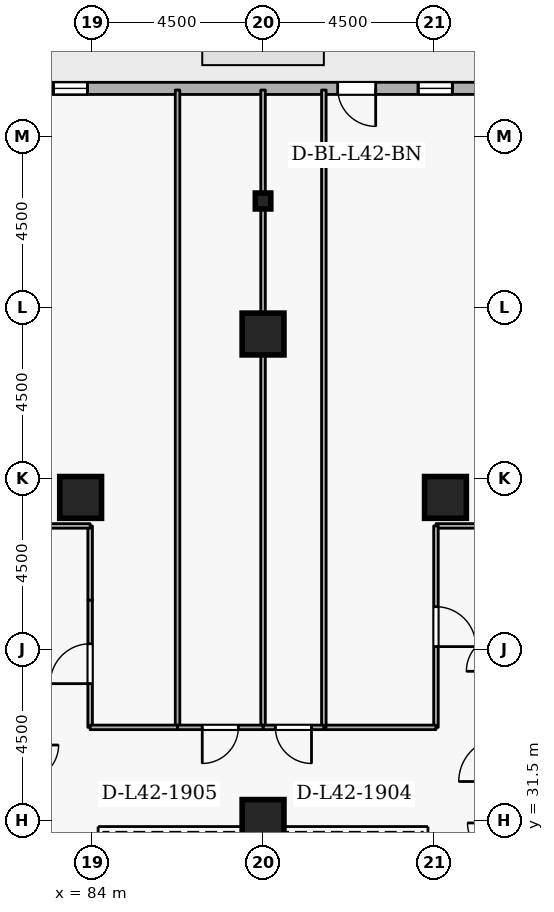
"""IFC4 building model, lengths in metres.
Left out: names, types, materials, properties, quantities, classifications, styles, units other than length and angle.
Written with IfcOpenShell. Run it as: python <this file> out.ifc"""

import sys

from ifc_helpers import new_model, si_unit, direction, frame, frame_2d, origin, origin_2d, place, context, subcontext, project, spatial, rectangle, i_section, extrude, element, fill, save


model = new_model("IFC4")
c1 = context("Model", 3, precision=1e-05, world=origin(), true_north=direction((0.0, 1.0)))
c2 = subcontext(c1, "Body", "Model", "MODEL_VIEW")
j1 = project(units=[si_unit("LENGTHUNIT", "METRE"), si_unit("PLANEANGLEUNIT", "RADIAN")], contexts=[c1])
p1 = place(None, origin())
s1 = spatial("IfcSite", under=j1, at=p1, CompositionType="ELEMENT")
p2 = place(p1, origin())
s2 = spatial("IfcBuilding", under=s1, at=p2, CompositionType="ELEMENT")
p3 = place(p2, frame((0.0, 0.0, 159.9)))
s3 = spatial("IfcBuildingStorey", under=s2, at=p3, CompositionType="ELEMENT", Elevation=159.9)
for number, where, z_axis, x_axis in (
    (1, (88.5, 44.3, 0.0), (0.0, 0.0, 1.0), (1.0, 0.0, 0.0)),
    (2, (93.3, 40.0, 0.0), (0.0, 0.0, 1.0), (1.0, 0.0, 0.0)),
    (3, (83.7, 40.0, 0.0), (0.0, 0.0, 1.0), (1.0, 0.0, 0.0)),
    (4, (88.5, 31.5, 0.0), (0.0, 0.0, 1.0), (1.0, 0.0, 0.0)),
):
    element("IfcColumn", number, at=place(p3, frame(where, z_axis=z_axis, x_axis=x_axis)), inside=s3, PredefinedType="COLUMN", context=c2, shape_type="SweptSolid", body=[
        extrude(rectangle(XDim=1.1, YDim=1.1, at=origin_2d()), origin(), (0.0, 0.0, 1.0), 3.6),
    ])
p4 = place(p3, frame((88.5, 47.8, 0.0), z_axis=(0.0, 0.0, 1.0), x_axis=(1.0, 0.0, 0.0)))
e5 = element("IfcColumn", 5, at=p4, inside=s3, PredefinedType="COLUMN", context=c2, shape_type="SweptSolid", body=[
    extrude(i_section(OverallWidth=0.407, OverallDepth=0.419, WebThickness=0.031, FlangeThickness=0.049, FilletRadius=0.015, at=origin_2d()), origin(), (0.0, 0.0, 1.0), 3.6),
])
p5 = place(p3, frame((109.681, 50.765, 0.0), z_axis=(0.0, 0.0, 1.0), x_axis=(-0.999999997144, -7.5574884e-05, 0.0)))
e6 = element("IfcWall", 6, at=p5, inside=s3, PredefinedType="STANDARD", context=c2, shape_type="SweptSolid", body=[
    extrude(rectangle(XDim=35.535, YDim=0.32, at=frame_2d((17.768, 0.0))), origin(), (0.0, 0.0, 1.0), 2.7),
])
p6 = place(p5, frame((18.218, 0.0, 0.0)))
e7 = element("IfcOpeningElement", 7, at=p6, cuts=e6, PredefinedType="OPENING", context=c2, shape_type="SweptSolid", body=[
    extrude(rectangle(XDim=1.0, YDim=2.08, at=frame_2d((0.5, 1.04))), frame((0.0, 0.17, 0.0), z_axis=(0.0, -1.0, 0.0), x_axis=(1.0, 0.0, 0.0)), (0.0, 0.0, 1.0), 0.34),
])
p7 = place(p5, frame((1.8, 0.0, 0.72)))
e8 = element("IfcOpeningElement", 8, at=p7, cuts=e6, PredefinedType="OPENING", context=c2, shape_type="SweptSolid", body=[
    extrude(rectangle(XDim=0.9, YDim=1.75, at=frame_2d((0.45, 0.875))), frame((0.0, 0.17, 0.0), z_axis=(0.0, -1.0, 0.0), x_axis=(1.0, 0.0, 0.0)), (0.0, 0.0, 1.0), 0.34),
])
p8 = place(p5, frame((6.6, 0.0, 0.72)))
e9 = element("IfcOpeningElement", 9, at=p8, cuts=e6, PredefinedType="OPENING", context=c2, shape_type="SweptSolid", body=[
    extrude(rectangle(XDim=0.9, YDim=1.75, at=frame_2d((0.45, 0.875))), frame((0.0, 0.17, 0.0), z_axis=(0.0, -1.0, 0.0), x_axis=(1.0, 0.0, 0.0)), (0.0, 0.0, 1.0), 0.34),
])
p9 = place(p5, frame((11.4, 0.0, 0.72)))
e10 = element("IfcOpeningElement", 10, at=p9, cuts=e6, PredefinedType="OPENING", context=c2, shape_type="SweptSolid", body=[
    extrude(rectangle(XDim=0.9, YDim=1.75, at=frame_2d((0.45, 0.875))), frame((0.0, 0.17, 0.0), z_axis=(0.0, -1.0, 0.0), x_axis=(1.0, 0.0, 0.0)), (0.0, 0.0, 1.0), 0.34),
])
p10 = place(p5, frame((16.2, 0.0, 0.72)))
e11 = element("IfcOpeningElement", 11, at=p10, cuts=e6, PredefinedType="OPENING", context=c2, shape_type="SweptSolid", body=[
    extrude(rectangle(XDim=0.9, YDim=1.75, at=frame_2d((0.45, 0.875))), frame((0.0, 0.17, 0.0), z_axis=(0.0, -1.0, 0.0), x_axis=(1.0, 0.0, 0.0)), (0.0, 0.0, 1.0), 0.34),
])
p11 = place(p5, frame((25.8, 0.0, 0.72)))
e12 = element("IfcOpeningElement", 12, at=p11, cuts=e6, PredefinedType="OPENING", context=c2, shape_type="SweptSolid", body=[
    extrude(rectangle(XDim=0.9, YDim=1.75, at=frame_2d((0.45, 0.875))), frame((0.0, 0.17, 0.0), z_axis=(0.0, -1.0, 0.0), x_axis=(1.0, 0.0, 0.0)), (0.0, 0.0, 1.0), 0.34),
])
p12 = place(p5, frame((30.6, 0.0, 0.72)))
e13 = element("IfcOpeningElement", 13, at=p12, cuts=e6, PredefinedType="OPENING", context=c2, shape_type="SweptSolid", body=[
    extrude(rectangle(XDim=0.9, YDim=1.75, at=frame_2d((0.45, 0.875))), frame((0.0, 0.17, 0.0), z_axis=(0.0, -1.0, 0.0), x_axis=(1.0, 0.0, 0.0)), (0.0, 0.0, 1.0), 0.34),
])
p13 = place(p3, frame((94.8, 39.25, 0.0), z_axis=(0.0, 0.0, 1.0), x_axis=(-1.0, 0.0, 0.0)))
e14 = element("IfcWall", 14, at=p13, inside=s3, PredefinedType="PARTITIONING", context=c2, shape_type="SweptSolid", body=[
    extrude(rectangle(XDim=1.75, YDim=0.12, at=frame_2d((0.875, 0.0))), origin(), (0.0, 0.0, 1.0), 3.34),
])
p14 = place(p3, frame((93.05, 39.25, 0.0), z_axis=(0.0, 0.0, 1.0), x_axis=(0.0, -1.0, 0.0)))
e15 = element("IfcWall", 15, at=p14, inside=s3, PredefinedType="PARTITIONING", context=c2, shape_type="SweptSolid", body=[
    extrude(rectangle(XDim=5.3, YDim=0.12, at=frame_2d((2.65, 0.0))), origin(), (0.0, 0.0, 1.0), 3.34),
])
p15 = place(p14, frame((2.125, 0.0, 0.0)))
e16 = element("IfcOpeningElement", 16, at=p15, cuts=e15, PredefinedType="OPENING", context=c2, shape_type="SweptSolid", body=[
    extrude(rectangle(XDim=1.05, YDim=2.1, at=frame_2d((0.525, 1.05))), frame((0.0, 0.07, 0.0), z_axis=(0.0, -1.0, 0.0), x_axis=(1.0, 0.0, 0.0)), (0.0, 0.0, 1.0), 0.14),
])
p16 = place(p3, frame((93.05, 33.95, 0.0), z_axis=(0.0, 0.0, 1.0), x_axis=(-1.0, 0.0, 0.0)))
e17 = element("IfcWall", 17, at=p16, inside=s3, PredefinedType="PARTITIONING", context=c2, shape_type="SweptSolid", body=[
    extrude(rectangle(XDim=2.95, YDim=0.12, at=frame_2d((1.475, 0.0))), origin(), (0.0, 0.0, 1.0), 3.34),
])
p17 = place(p3, frame((90.1, 33.95, 0.0), z_axis=(0.0, 0.0, 1.0), x_axis=(0.0, 1.0, 0.0)))
e18 = element("IfcWall", 18, at=p17, inside=s3, PredefinedType="PARTITIONING", context=c2, shape_type="SweptSolid", body=[
    extrude(rectangle(XDim=16.77, YDim=0.12, at=frame_2d((8.385, 0.0))), origin(), (0.0, 0.0, 1.0), 3.34),
])
p18 = place(p3, frame((88.5, 33.95, 0.0), z_axis=(0.0, 0.0, 1.0), x_axis=(0.0, 1.0, 0.0)))
e19 = element("IfcWall", 19, at=p18, inside=s3, PredefinedType="PARTITIONING", context=c2, shape_type="SweptSolid", body=[
    extrude(rectangle(XDim=16.77, YDim=0.12, at=frame_2d((8.385, 0.0))), origin(), (0.0, 0.0, 1.0), 2.878),
])
p19 = place(p3, frame((90.1, 33.95, 0.0), z_axis=(0.0, 0.0, 1.0), x_axis=(-1.0, 0.0, 0.0)))
e20 = element("IfcWall", 20, at=p19, inside=s3, PredefinedType="PARTITIONING", context=c2, shape_type="SweptSolid", body=[
    extrude(rectangle(XDim=1.6, YDim=0.12, at=frame_2d((0.8, 0.0))), origin(), (0.0, 0.0, 1.0), 3.34),
])
p20 = place(p19, frame((0.325, 0.0, 0.0)))
e21 = element("IfcOpeningElement", 21, at=p20, cuts=e20, PredefinedType="OPENING", context=c2, shape_type="SweptSolid", body=[
    extrude(rectangle(XDim=0.95, YDim=2.1, at=frame_2d((0.475, 1.05))), frame((0.0, 0.07, 0.0), z_axis=(0.0, -1.0, 0.0), x_axis=(1.0, 0.0, 0.0)), (0.0, 0.0, 1.0), 0.14),
])
p21 = place(p3, frame((86.25, 33.95, 0.0), z_axis=(0.0, 0.0, 1.0), x_axis=(0.0, 1.0, 0.0)))
e22 = element("IfcWall", 22, at=p21, inside=s3, PredefinedType="PARTITIONING", context=c2, shape_type="SweptSolid", body=[
    extrude(rectangle(XDim=16.77, YDim=0.12, at=frame_2d((8.385, 0.0))), origin(), (0.0, 0.0, 1.0), 3.34),
])
p22 = place(p3, frame((88.5, 33.95, 0.0), z_axis=(0.0, 0.0, 1.0), x_axis=(-1.0, 0.0, 0.0)))
e23 = element("IfcWall", 23, at=p22, inside=s3, PredefinedType="PARTITIONING", context=c2, shape_type="SweptSolid", body=[
    extrude(rectangle(XDim=2.25, YDim=0.12, at=frame_2d((1.125, 0.0))), origin(), (0.0, 0.0, 1.0), 3.34),
])
p23 = place(p22, frame((0.65, 0.0, 0.0)))
e24 = element("IfcOpeningElement", 24, at=p23, cuts=e23, PredefinedType="OPENING", context=c2, shape_type="SweptSolid", body=[
    extrude(rectangle(XDim=0.95, YDim=2.1, at=frame_2d((0.475, 1.05))), frame((0.0, 0.07, 0.0), z_axis=(0.0, -1.0, 0.0), x_axis=(1.0, 0.0, 0.0)), (0.0, 0.0, 1.0), 0.14),
])
p24 = place(p3, frame((83.95, 33.95, 0.0), z_axis=(0.0, 0.0, 1.0), x_axis=(0.0, 1.0, 0.0)))
e25 = element("IfcWall", 25, at=p24, inside=s3, PredefinedType="PARTITIONING", context=c2, shape_type="SweptSolid", body=[
    extrude(rectangle(XDim=3.35, YDim=0.12, at=frame_2d((1.675, 0.0))), origin(), (0.0, 0.0, 1.0), 3.34),
])
p25 = place(p24, frame((1.15, 0.0, 0.0)))
e26 = element("IfcOpeningElement", 26, at=p25, cuts=e25, PredefinedType="OPENING", context=c2, shape_type="SweptSolid", body=[
    extrude(rectangle(XDim=1.05, YDim=2.1, at=frame_2d((0.525, 1.05))), frame((0.0, 0.07, 0.0), z_axis=(0.0, -1.0, 0.0), x_axis=(1.0, 0.0, 0.0)), (0.0, 0.0, 1.0), 0.14),
])
p26 = place(p3, frame((83.95, 37.3, 0.0), z_axis=(0.0, 0.0, 1.0), x_axis=(0.0, 1.0, 0.0)))
e27 = element("IfcWall", 27, at=p26, inside=s3, PredefinedType="PARTITIONING", context=c2, shape_type="SweptSolid", body=[
    extrude(rectangle(XDim=1.95, YDim=0.12, at=frame_2d((0.975, 0.0))), origin(), (0.0, 0.0, 1.0), 3.34),
])
p27 = place(p3, frame((83.95, 39.25, 0.0), z_axis=(0.0, 0.0, 1.0), x_axis=(-1.0, 0.0, 0.0)))
e28 = element("IfcWall", 28, at=p27, inside=s3, PredefinedType="PARTITIONING", context=c2, shape_type="SweptSolid", body=[
    extrude(rectangle(XDim=1.75, YDim=0.12, at=frame_2d((0.875, 0.0))), origin(), (0.0, 0.0, 1.0), 3.34),
])
p28 = place(p3, frame((86.25, 33.95, 0.0), z_axis=(0.0, 0.0, 1.0), x_axis=(-1.0, 0.0, 0.0)))
e29 = element("IfcWall", 29, at=p28, inside=s3, PredefinedType="PARTITIONING", context=c2, shape_type="SweptSolid", body=[
    extrude(rectangle(XDim=2.3, YDim=0.12, at=frame_2d((1.15, 0.0))), origin(), (0.0, 0.0, 1.0), 3.34),
])
p29 = place(p6, origin())
e30 = element("IfcDoor", 30, at=p29, inside=s3, OperationType="SINGLE_SWING_LEFT", PredefinedType="DOOR", context=c2, shape_type="SweptSolid", body=[
    extrude(rectangle(XDim=1.0, YDim=2.08, at=frame_2d((0.5, 1.04))), frame((0.0, 0.025, 0.0), z_axis=(0.0, -1.0, 0.0), x_axis=(1.0, 0.0, 0.0)), (0.0, 0.0, 1.0), 0.05),
])
fill(e7, e30)
p30 = place(p10, origin())
e31 = element("IfcWindow", 31, at=p30, inside=s3, PartitioningType="SINGLE_PANEL", PredefinedType="WINDOW", context=c2, shape_type="SweptSolid", body=[
    extrude(rectangle(XDim=0.9, YDim=1.75, at=frame_2d((0.45, 0.875))), frame((0.0, 0.03, 0.0), z_axis=(0.0, -1.0, 0.0), x_axis=(1.0, 0.0, 0.0)), (0.0, 0.0, 1.0), 0.06),
])
fill(e11, e31)
p31 = place(p11, origin())
e32 = element("IfcWindow", 32, at=p31, inside=s3, PartitioningType="SINGLE_PANEL", PredefinedType="WINDOW", context=c2, shape_type="SweptSolid", body=[
    extrude(rectangle(XDim=0.9, YDim=1.75, at=frame_2d((0.45, 0.875))), frame((0.0, 0.03, 0.0), z_axis=(0.0, -1.0, 0.0), x_axis=(1.0, 0.0, 0.0)), (0.0, 0.0, 1.0), 0.06),
])
fill(e12, e32)
p32 = place(p15, origin())
e33 = element("IfcDoor", 33, at=p32, inside=s3, OperationType="SINGLE_SWING_RIGHT", PredefinedType="DOOR", context=c2, shape_type="SweptSolid", body=[
    extrude(rectangle(XDim=1.05, YDim=2.1, at=frame_2d((0.525, 1.05))), frame((0.0, 0.025, 0.0), z_axis=(0.0, -1.0, 0.0), x_axis=(1.0, 0.0, 0.0)), (0.0, 0.0, 1.0), 0.05),
])
fill(e16, e33)
p33 = place(p20, origin())
e34 = element("IfcDoor", 34, at=p33, inside=s3, OperationType="SINGLE_SWING_LEFT", PredefinedType="DOOR", context=c2, shape_type="SweptSolid", body=[
    extrude(rectangle(XDim=0.95, YDim=2.1, at=frame_2d((0.475, 1.05))), frame((0.0, 0.025, 0.0), z_axis=(0.0, -1.0, 0.0), x_axis=(1.0, 0.0, 0.0)), (0.0, 0.0, 1.0), 0.05),
])
fill(e21, e34)
p34 = place(p23, origin())
e35 = element("IfcDoor", 35, at=p34, inside=s3, OperationType="SINGLE_SWING_RIGHT", PredefinedType="DOOR", context=c2, shape_type="SweptSolid", body=[
    extrude(rectangle(XDim=0.95, YDim=2.1, at=frame_2d((0.475, 1.05))), frame((0.0, 0.025, 0.0), z_axis=(0.0, -1.0, 0.0), x_axis=(1.0, 0.0, 0.0)), (0.0, 0.0, 1.0), 0.05),
])
fill(e24, e35)
p35 = place(p25, origin())
e36 = element("IfcDoor", 36, at=p35, inside=s3, OperationType="SINGLE_SWING_LEFT", PredefinedType="DOOR", context=c2, shape_type="SweptSolid", body=[
    extrude(rectangle(XDim=1.05, YDim=2.1, at=frame_2d((0.525, 1.05))), frame((0.0, 0.025, 0.0), z_axis=(0.0, -1.0, 0.0), x_axis=(1.0, 0.0, 0.0)), (0.0, 0.0, 1.0), 0.05),
])
fill(e26, e36)
save(model, sys.argv[1])
